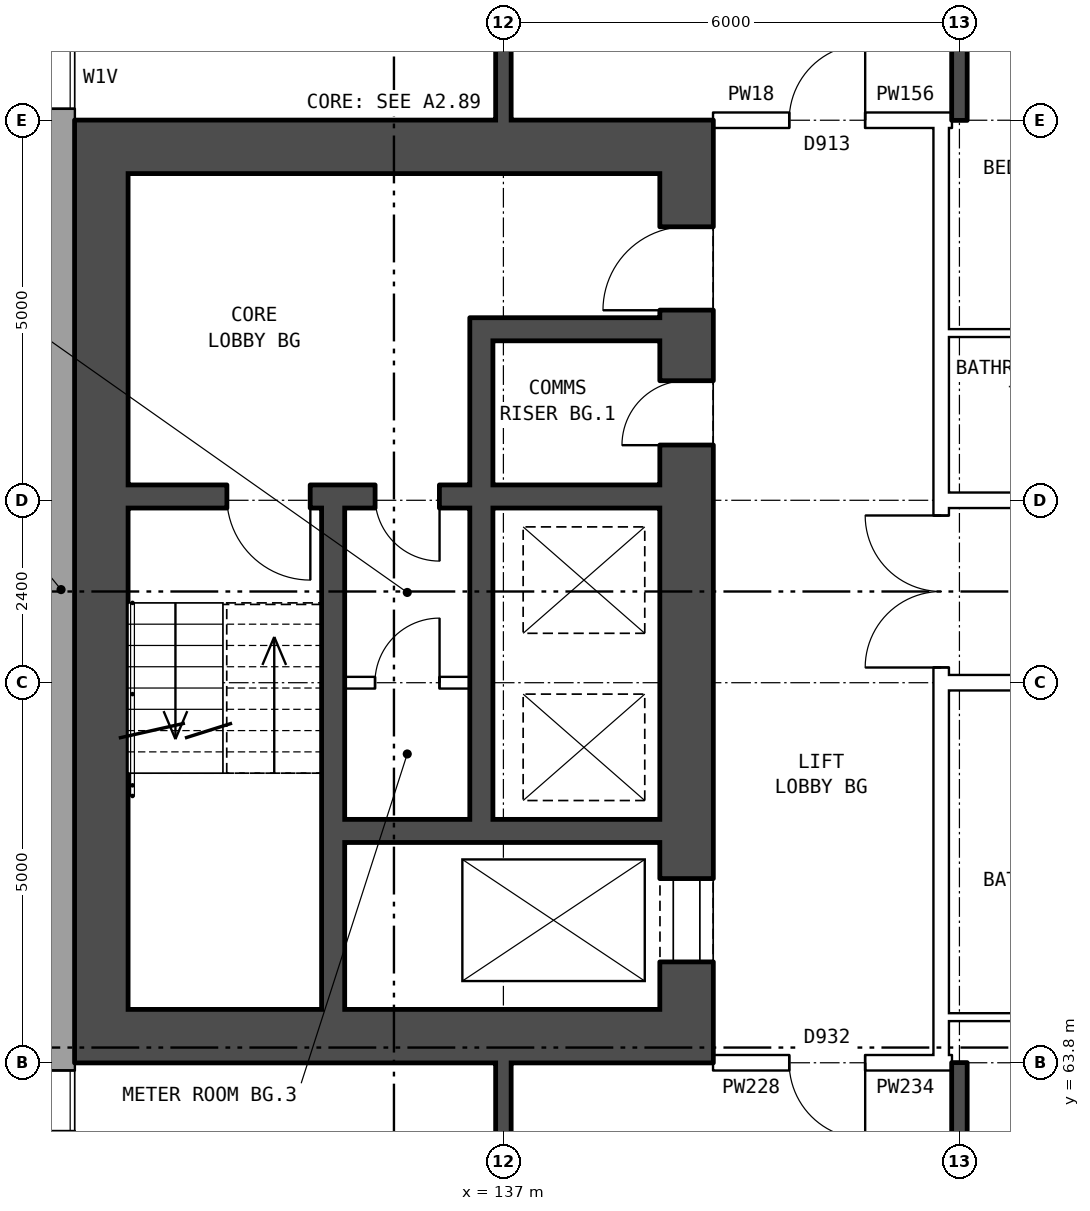
"""IFC4 building model, lengths in metres.
Left out: names, types, materials, properties, quantities, classifications, styles, units other than length and angle.
Written with IfcOpenShell. Run it as: python <this file> out.ifc"""

import sys

from ifc_helpers import new_model, si_unit, direction, frame, frame_2d, origin, place, context, subcontext, project, spatial, rectangle, extrude, element, fill, save


model = new_model("IFC4")
c1 = context("Model", 3, precision=1e-05, world=origin(), true_north=direction((0.0, 1.0)))
c2 = subcontext(c1, "Body", "Model", "MODEL_VIEW")
j1 = project(units=[si_unit("LENGTHUNIT", "METRE"), si_unit("PLANEANGLEUNIT", "RADIAN")], contexts=[c1])
p1 = place(None, origin())
s1 = spatial("IfcSite", under=j1, at=p1, CompositionType="ELEMENT")
p2 = place(p1, origin())
s2 = spatial("IfcBuilding", under=s1, at=p2, CompositionType="ELEMENT")
p3 = place(p2, frame((0.0, 0.0, 71.6)))
s3 = spatial("IfcBuildingStorey", under=s2, at=p3, CompositionType="ELEMENT", Elevation=71.6)
p4 = place(p3, frame((131.18, 82.925, 0.0), z_axis=(0.0, 0.0, 1.0), x_axis=(0.0, -1.0, 0.0)))
e1 = element("IfcWall", 1, at=p4, inside=s3, PredefinedType="STANDARD", context=c2, shape_type="SweptSolid", body=[
    extrude(rectangle(XDim=25.851, YDim=0.36, at=frame_2d((12.925, 0.0))), origin(), (0.0, 0.0, 1.0), 2.85),
])
p5 = place(p4, frame((1.625, 0.0, 0.8)))
e2 = element("IfcOpeningElement", 2, at=p5, cuts=e1, PredefinedType="OPENING", context=c2, shape_type="SweptSolid", body=[
    extrude(rectangle(XDim=1.6, YDim=1.8, at=frame_2d((0.8, 0.9))), frame((0.0, 0.19, 0.0), z_axis=(0.0, -1.0, 0.0), x_axis=(1.0, 0.0, 0.0)), (0.0, 0.0, 1.0), 0.38),
])
p6 = place(p4, frame((3.525, 0.0, 1.7)))
e3 = element("IfcOpeningElement", 3, at=p6, cuts=e1, PredefinedType="OPENING", context=c2, shape_type="SweptSolid", body=[
    extrude(rectangle(XDim=1.2, YDim=0.9, at=frame_2d((0.6, 0.45))), frame((0.0, 0.19, 0.0), z_axis=(0.0, -1.0, 0.0), x_axis=(1.0, 0.0, 0.0)), (0.0, 0.0, 1.0), 0.38),
])
p7 = place(p4, frame((19.225, 0.0, 0.8)))
e4 = element("IfcOpeningElement", 4, at=p7, cuts=e1, PredefinedType="OPENING", context=c2, shape_type="SweptSolid", body=[
    extrude(rectangle(XDim=0.8, YDim=0.9, at=frame_2d((0.4, 0.45))), frame((0.0, 0.19, 0.0), z_axis=(0.0, -1.0, 0.0), x_axis=(1.0, 0.0, 0.0)), (0.0, 0.0, 1.0), 0.38),
])
p8 = place(p4, frame((22.625, 0.0, 0.8)))
e5 = element("IfcOpeningElement", 5, at=p8, cuts=e1, PredefinedType="OPENING", context=c2, shape_type="SweptSolid", body=[
    extrude(rectangle(XDim=1.6, YDim=1.8, at=frame_2d((0.8, 0.9))), frame((0.0, 0.19, 0.0), z_axis=(0.0, -1.0, 0.0), x_axis=(1.0, 0.0, 0.0)), (0.0, 0.0, 1.0), 0.38),
])
p9 = place(p4, frame((5.775, 0.0, 0.8)))
e6 = element("IfcOpeningElement", 6, at=p9, cuts=e1, PredefinedType="OPENING", context=c2, shape_type="SweptSolid", body=[
    extrude(rectangle(XDim=0.8, YDim=0.9, at=frame_2d((0.4, 0.45))), frame((0.0, 0.19, 0.0), z_axis=(0.0, -1.0, 0.0), x_axis=(1.0, 0.0, 0.0)), (0.0, 0.0, 1.0), 0.38),
])
p10 = place(p4, frame((21.075, 0.0, 1.7)))
e7 = element("IfcOpeningElement", 7, at=p10, cuts=e1, PredefinedType="OPENING", context=c2, shape_type="SweptSolid", body=[
    extrude(rectangle(XDim=1.2, YDim=0.9, at=frame_2d((0.6, 0.45))), frame((0.0, 0.19, 0.0), z_axis=(0.0, -1.0, 0.0), x_axis=(1.0, 0.0, 0.0)), (0.0, 0.0, 1.0), 0.38),
])
p11 = place(p3, frame((139.41, 64.5, 0.0), z_axis=(0.0, 0.0, 1.0), x_axis=(0.0, 1.0, 0.0)))
e8 = element("IfcWall", 8, at=p11, inside=s3, PredefinedType="SHEAR", context=c2, shape_type="SweptSolid", body=[
    extrude(rectangle(XDim=11.0, YDim=0.7, at=frame_2d((5.5, 0.0))), origin(), (0.0, 0.0, 1.0), 2.85),
])
p12 = place(p11, frame((0.625, 0.0, 0.0)))
e9 = element("IfcOpeningElement", 9, at=p12, cuts=e8, PredefinedType="OPENING", context=c2, shape_type="SweptSolid", body=[
    extrude(rectangle(XDim=1.1, YDim=2.1, at=frame_2d((0.55, 1.05))), frame((0.0, 0.36, 0.0), z_axis=(0.0, -1.0, 0.0), x_axis=(1.0, 0.0, 0.0)), (0.0, 0.0, 1.0), 0.72),
])
p13 = place(p11, frame((9.2, 0.0, 0.0)))
e10 = element("IfcOpeningElement", 10, at=p13, cuts=e8, PredefinedType="OPENING", context=c2, shape_type="SweptSolid", body=[
    extrude(rectangle(XDim=1.1, YDim=2.1, at=frame_2d((0.55, 1.05))), frame((0.0, 0.36, 0.0), z_axis=(0.0, -1.0, 0.0), x_axis=(1.0, 0.0, 0.0)), (0.0, 0.0, 1.0), 0.72),
])
p14 = place(p11, frame((7.425, 0.0, 0.0)))
e11 = element("IfcOpeningElement", 11, at=p14, cuts=e8, PredefinedType="OPENING", context=c2, shape_type="SweptSolid", body=[
    extrude(rectangle(XDim=0.85, YDim=2.1, at=frame_2d((0.425, 1.05))), frame((0.0, 0.36, 0.0), z_axis=(0.0, -1.0, 0.0), x_axis=(1.0, 0.0, 0.0)), (0.0, 0.0, 1.0), 0.72),
])
p15 = place(p3, frame((131.71, 64.5, 0.0), z_axis=(0.0, 0.0, 1.0), x_axis=(0.0, 1.0, 0.0)))
e12 = element("IfcWall", 12, at=p15, inside=s3, PredefinedType="SHEAR", context=c2, shape_type="SweptSolid", body=[
    extrude(rectangle(XDim=11.0, YDim=0.7, at=frame_2d((5.5, 0.0))), origin(), (0.0, 0.0, 1.0), 2.85),
])
for number, where, z_axis, x_axis in (
    (13, (139.76, 64.15, 0.0), (0.0, 0.0, 1.0), (-1.0, 0.0, 0.0)),
    (14, (139.76, 75.85, 0.0), (0.0, 0.0, 1.0), (-1.0, 0.0, 0.0)),
):
    element("IfcWall", number, at=place(p3, frame(where, z_axis=z_axis, x_axis=x_axis)), inside=s3, PredefinedType="SHEAR", context=c2, shape_type="SweptSolid", body=[
        extrude(rectangle(XDim=8.4, YDim=0.7, at=frame_2d((4.2, 0.0))), origin(), (0.0, 0.0, 1.0), 2.85),
    ])
p16 = place(p3, frame((139.06, 66.85, 0.0), z_axis=(0.0, 0.0, 1.0), x_axis=(-1.0, 0.0, 0.0)))
e15 = element("IfcWall", 15, at=p16, inside=s3, PredefinedType="SHEAR", context=c2, shape_type="SweptSolid", body=[
    extrude(rectangle(XDim=4.15, YDim=0.3, at=frame_2d((2.075, 0.0))), origin(), (0.0, 0.0, 1.0), 2.85),
])
p17 = place(p3, frame((136.56, 68.8, 0.0), z_axis=(0.0, 0.0, 1.0), x_axis=(-1.0, 0.0, 0.0)))
e16 = element("IfcWall", 16, at=p17, inside=s3, PredefinedType="PARTITIONING", context=c2, shape_type="SweptSolid", body=[
    extrude(rectangle(XDim=1.65, YDim=0.15, at=frame_2d((0.825, 0.0))), origin(), (0.0, 0.0, 1.0), 2.85),
])
p18 = place(p17, frame((0.4, 0.0, 0.0)))
e17 = element("IfcOpeningElement", 17, at=p18, cuts=e16, PredefinedType="OPENING", context=c2, shape_type="SweptSolid", body=[
    extrude(rectangle(XDim=0.85, YDim=2.1, at=frame_2d((0.425, 1.05))), frame((0.0, 0.085, 0.0), z_axis=(0.0, -1.0, 0.0), x_axis=(1.0, 0.0, 0.0)), (0.0, 0.0, 1.0), 0.17),
])
p19 = place(p3, frame((139.06, 71.25, 0.0), z_axis=(0.0, 0.0, 1.0), x_axis=(-1.0, 0.0, 0.0)))
e18 = element("IfcWall", 18, at=p19, inside=s3, PredefinedType="SHEAR", context=c2, shape_type="SweptSolid", body=[
    extrude(rectangle(XDim=7.0, YDim=0.3, at=frame_2d((3.5, 0.0))), origin(), (0.0, 0.0, 1.0), 2.85),
])
p20 = place(p19, frame((4.6, 0.0, 0.0)))
e19 = element("IfcOpeningElement", 19, at=p20, cuts=e18, PredefinedType="OPENING", context=c2, shape_type="SweptSolid", body=[
    extrude(rectangle(XDim=1.1, YDim=2.1, at=frame_2d((0.55, 1.05))), frame((0.0, 0.16, 0.0), z_axis=(0.0, -1.0, 0.0), x_axis=(1.0, 0.0, 0.0)), (0.0, 0.0, 1.0), 0.32),
])
p21 = place(p19, frame((2.9, 0.0, 0.0)))
e20 = element("IfcOpeningElement", 20, at=p21, cuts=e18, PredefinedType="OPENING", context=c2, shape_type="SweptSolid", body=[
    extrude(rectangle(XDim=0.85, YDim=2.1, at=frame_2d((0.425, 1.05))), frame((0.0, 0.16, 0.0), z_axis=(0.0, -1.0, 0.0), x_axis=(1.0, 0.0, 0.0)), (0.0, 0.0, 1.0), 0.32),
])
p22 = place(p3, frame((139.06, 73.45, 0.0), z_axis=(0.0, 0.0, 1.0), x_axis=(-1.0, 0.0, 0.0)))
e21 = element("IfcWall", 21, at=p22, inside=s3, PredefinedType="SHEAR", context=c2, shape_type="SweptSolid", body=[
    extrude(rectangle(XDim=2.2, YDim=0.3, at=frame_2d((1.1, 0.0))), origin(), (0.0, 0.0, 1.0), 2.85),
])
p23 = place(p3, frame((136.71, 67.0, 0.0), z_axis=(0.0, 0.0, 1.0), x_axis=(0.0, 1.0, 0.0)))
e22 = element("IfcWall", 22, at=p23, inside=s3, PredefinedType="SHEAR", context=c2, shape_type="SweptSolid", body=[
    extrude(rectangle(XDim=4.1, YDim=0.3, at=frame_2d((2.05, 0.0))), origin(), (0.0, 0.0, 1.0), 2.85),
])
p24 = place(p3, frame((136.71, 71.4, 0.0), z_axis=(0.0, 0.0, 1.0), x_axis=(0.0, 1.0, 0.0)))
e23 = element("IfcWall", 23, at=p24, inside=s3, PredefinedType="SHEAR", context=c2, shape_type="SweptSolid", body=[
    extrude(rectangle(XDim=2.2, YDim=0.3, at=frame_2d((1.1, 0.0))), origin(), (0.0, 0.0, 1.0), 2.85),
])
p25 = place(p3, frame((134.76, 64.5, 0.0), z_axis=(0.0, 0.0, 1.0), x_axis=(0.0, 1.0, 0.0)))
e24 = element("IfcWall", 24, at=p25, inside=s3, PredefinedType="SHEAR", context=c2, shape_type="SweptSolid", body=[
    extrude(rectangle(XDim=6.6, YDim=0.3, at=frame_2d((3.3, 0.0))), origin(), (0.0, 0.0, 1.0), 2.85),
])
p26 = place(p3, frame((142.76, 63.9, 0.0), z_axis=(0.0, 0.0, 1.0), x_axis=(0.0, 1.0, 0.0)))
e25 = element("IfcWall", 25, at=p26, inside=s3, PredefinedType="PARTITIONING", context=c2, shape_type="SweptSolid", body=[
    extrude(rectangle(XDim=12.2, YDim=0.2, at=frame_2d((6.1, 0.0))), origin(), (0.0, 0.0, 1.0), 2.85),
])
p27 = place(p26, frame((5.1, 0.0, 0.0)))
e26 = element("IfcOpeningElement", 26, at=p27, cuts=e25, PredefinedType="OPENING", context=c2, shape_type="SweptSolid", body=[
    extrude(rectangle(XDim=2.0, YDim=2.1, at=frame_2d((1.0, 1.05))), frame((0.0, 0.11, 0.0), z_axis=(0.0, -1.0, 0.0), x_axis=(1.0, 0.0, 0.0)), (0.0, 0.0, 1.0), 0.22),
])
p28 = place(p3, frame((139.76, 63.8, 0.0), z_axis=(0.0, 0.0, 1.0), x_axis=(1.0, 0.0, 0.0)))
e27 = element("IfcWall", 27, at=p28, inside=s3, PredefinedType="PARTITIONING", context=c2, shape_type="SweptSolid", body=[
    extrude(rectangle(XDim=3.0, YDim=0.2, at=frame_2d((1.5, 0.0))), origin(), (0.0, 0.0, 1.0), 2.85),
])
p29 = place(p28, frame((1.0, 0.0, 0.0)))
e28 = element("IfcOpeningElement", 28, at=p29, cuts=e27, PredefinedType="OPENING", context=c2, shape_type="SweptSolid", body=[
    extrude(rectangle(XDim=1.0, YDim=2.1, at=frame_2d((0.5, 1.05))), frame((0.0, 0.11, 0.0), z_axis=(0.0, -1.0, 0.0), x_axis=(1.0, 0.0, 0.0)), (0.0, 0.0, 1.0), 0.22),
])
p30 = place(p3, frame((142.76, 63.8, 0.0), z_axis=(0.0, 0.0, 1.0), x_axis=(1.0, 0.0, 0.0)))
e29 = element("IfcWall", 29, at=p30, inside=s3, PredefinedType="PARTITIONING", context=c2, shape_type="SweptSolid", body=[
    extrude(rectangle(XDim=0.14, YDim=0.2, at=frame_2d((0.07, 0.0))), origin(), (0.0, 0.0, 1.0), 2.85),
])
p31 = place(p3, frame((142.76, 64.4, 0.0), z_axis=(0.0, 0.0, 1.0), x_axis=(1.0, 0.0, 0.0)))
e30 = element("IfcWall", 30, at=p31, inside=s3, PredefinedType="PARTITIONING", context=c2, shape_type="SweptSolid", body=[
    extrude(rectangle(XDim=3.24, YDim=0.1, at=frame_2d((1.62, 0.0))), origin(), (0.0, 0.0, 1.0), 2.85),
])
p32 = place(p3, frame((142.76, 68.8, 0.0), z_axis=(0.0, 0.0, 1.0), x_axis=(1.0, 0.0, 0.0)))
e31 = element("IfcWall", 31, at=p32, inside=s3, PredefinedType="PARTITIONING", context=c2, shape_type="SweptSolid", body=[
    extrude(rectangle(XDim=14.48, YDim=0.2, at=frame_2d((7.24, 0.0))), origin(), (0.0, 0.0, 1.0), 2.85),
])
p33 = place(p32, frame((4.24, 0.0, 0.0)))
e32 = element("IfcOpeningElement", 32, at=p33, cuts=e31, PredefinedType="OPENING", context=c2, shape_type="SweptSolid", body=[
    extrude(rectangle(XDim=1.0, YDim=2.1, at=frame_2d((0.5, 1.05))), frame((0.0, 0.11, 0.0), z_axis=(0.0, -1.0, 0.0), x_axis=(1.0, 0.0, 0.0)), (0.0, 0.0, 1.0), 0.22),
])
p34 = place(p32, frame((10.24, 0.0, 0.0)))
e33 = element("IfcOpeningElement", 33, at=p34, cuts=e31, PredefinedType="OPENING", context=c2, shape_type="SweptSolid", body=[
    extrude(rectangle(XDim=1.0, YDim=2.1, at=frame_2d((0.5, 1.05))), frame((0.0, 0.11, 0.0), z_axis=(0.0, -1.0, 0.0), x_axis=(1.0, 0.0, 0.0)), (0.0, 0.0, 1.0), 0.22),
])
p35 = place(p3, frame((142.76, 71.2, 0.0), z_axis=(0.0, 0.0, 1.0), x_axis=(1.0, 0.0, 0.0)))
e34 = element("IfcWall", 34, at=p35, inside=s3, PredefinedType="PARTITIONING", context=c2, shape_type="SweptSolid", body=[
    extrude(rectangle(XDim=14.48, YDim=0.2, at=frame_2d((7.24, 0.0))), origin(), (0.0, 0.0, 1.0), 2.85),
])
p36 = place(p35, frame((4.24, 0.0, 0.0)))
e35 = element("IfcOpeningElement", 35, at=p36, cuts=e34, PredefinedType="OPENING", context=c2, shape_type="SweptSolid", body=[
    extrude(rectangle(XDim=1.0, YDim=2.1, at=frame_2d((0.5, 1.05))), frame((0.0, 0.11, 0.0), z_axis=(0.0, -1.0, 0.0), x_axis=(1.0, 0.0, 0.0)), (0.0, 0.0, 1.0), 0.22),
])
p37 = place(p35, frame((7.24, 0.0, 0.0)))
e36 = element("IfcOpeningElement", 36, at=p37, cuts=e34, PredefinedType="OPENING", context=c2, shape_type="SweptSolid", body=[
    extrude(rectangle(XDim=1.0, YDim=2.1, at=frame_2d((0.5, 1.05))), frame((0.0, 0.11, 0.0), z_axis=(0.0, -1.0, 0.0), x_axis=(1.0, 0.0, 0.0)), (0.0, 0.0, 1.0), 0.22),
])
p38 = place(p3, frame((142.76, 73.4, 0.0), z_axis=(0.0, 0.0, 1.0), x_axis=(1.0, 0.0, 0.0)))
e37 = element("IfcWall", 37, at=p38, inside=s3, PredefinedType="PARTITIONING", context=c2, shape_type="SweptSolid", body=[
    extrude(rectangle(XDim=3.24, YDim=0.1, at=frame_2d((1.62, 0.0))), origin(), (0.0, 0.0, 1.0), 2.85),
])
p39 = place(p3, frame((139.76, 76.2, 0.0), z_axis=(0.0, 0.0, 1.0), x_axis=(1.0, 0.0, 0.0)))
e38 = element("IfcWall", 38, at=p39, inside=s3, PredefinedType="PARTITIONING", context=c2, shape_type="SweptSolid", body=[
    extrude(rectangle(XDim=3.0, YDim=0.2, at=frame_2d((1.5, 0.0))), origin(), (0.0, 0.0, 1.0), 2.85),
])
p40 = place(p39, frame((1.0, 0.0, 0.0)))
e39 = element("IfcOpeningElement", 39, at=p40, cuts=e38, PredefinedType="OPENING", context=c2, shape_type="SweptSolid", body=[
    extrude(rectangle(XDim=1.0, YDim=2.1, at=frame_2d((0.5, 1.05))), frame((0.0, 0.11, 0.0), z_axis=(0.0, -1.0, 0.0), x_axis=(1.0, 0.0, 0.0)), (0.0, 0.0, 1.0), 0.22),
])
p41 = place(p3, frame((142.76, 76.2, 0.0), z_axis=(0.0, 0.0, 1.0), x_axis=(1.0, 0.0, 0.0)))
e40 = element("IfcWall", 40, at=p41, inside=s3, PredefinedType="PARTITIONING", context=c2, shape_type="SweptSolid", body=[
    extrude(rectangle(XDim=0.14, YDim=0.2, at=frame_2d((0.07, 0.0))), origin(), (0.0, 0.0, 1.0), 2.85),
])
p42 = place(p3, frame((137.0, 54.36, 0.0), z_axis=(0.0, 0.0, 1.0), x_axis=(0.0, 1.0, 0.0)))
e41 = element("IfcWall", 41, at=p42, inside=s3, PredefinedType="SOLIDWALL", context=c2, shape_type="SweptSolid", body=[
    extrude(rectangle(XDim=9.44, YDim=0.2, at=frame_2d((4.72, 0.0))), origin(), (0.0, 0.0, 1.0), 2.85),
])
p43 = place(p42, frame((1.37, 0.0, 0.0)))
e42 = element("IfcOpeningElement", 42, at=p43, cuts=e41, PredefinedType="OPENING", context=c2, shape_type="SweptSolid", body=[
    extrude(rectangle(XDim=0.9, YDim=2.1, at=frame_2d((0.45, 1.05))), frame((0.0, 0.11, 0.0), z_axis=(0.0, -1.0, 0.0), x_axis=(1.0, 0.0, 0.0)), (0.0, 0.0, 1.0), 0.22),
])
p44 = place(p42, frame((7.04, 0.0, 0.0)))
e43 = element("IfcOpeningElement", 43, at=p44, cuts=e41, PredefinedType="OPENING", context=c2, shape_type="SweptSolid", body=[
    extrude(rectangle(XDim=0.9, YDim=2.1, at=frame_2d((0.45, 1.05))), frame((0.0, 0.11, 0.0), z_axis=(0.0, -1.0, 0.0), x_axis=(1.0, 0.0, 0.0)), (0.0, 0.0, 1.0), 0.22),
])
p45 = place(p3, frame((137.0, 76.2, 0.0), z_axis=(0.0, 0.0, 1.0), x_axis=(0.0, 1.0, 0.0)))
e44 = element("IfcWall", 44, at=p45, inside=s3, PredefinedType="SOLIDWALL", context=c2, shape_type="SweptSolid", body=[
    extrude(rectangle(XDim=9.44, YDim=0.2, at=frame_2d((4.72, 0.0))), origin(), (0.0, 0.0, 1.0), 2.85),
])
p46 = place(p45, frame((1.5, 0.0, 0.0)))
e45 = element("IfcOpeningElement", 45, at=p46, cuts=e44, PredefinedType="OPENING", context=c2, shape_type="SweptSolid", body=[
    extrude(rectangle(XDim=0.9, YDim=2.1, at=frame_2d((0.45, 1.05))), frame((0.0, 0.11, 0.0), z_axis=(0.0, -1.0, 0.0), x_axis=(1.0, 0.0, 0.0)), (0.0, 0.0, 1.0), 0.22),
])
for number, where, z_axis, x_axis in (
    (46, (143.0, 54.36, 0.0), (0.0, 0.0, 1.0), (0.0, 1.0, 0.0)),
    (47, (143.0, 76.2, 0.0), (0.0, 0.0, 1.0), (0.0, 1.0, 0.0)),
):
    element("IfcWall", number, at=place(p3, frame(where, z_axis=z_axis, x_axis=x_axis)), inside=s3, PredefinedType="SOLIDWALL", context=c2, shape_type="SweptSolid", body=[
        extrude(rectangle(XDim=9.44, YDim=0.2, at=frame_2d((4.72, 0.0))), origin(), (0.0, 0.0, 1.0), 2.85),
    ])
p47 = place(p7, origin())
e48 = element("IfcWindow", 48, at=p47, inside=s3, PartitioningType="SINGLE_PANEL", PredefinedType="WINDOW", context=c2, shape_type="SweptSolid", body=[
    extrude(rectangle(XDim=0.8, YDim=0.9, at=frame_2d((0.4, 0.45))), frame((0.0, 0.15, 0.0), z_axis=(0.0, -1.0, 0.0), x_axis=(1.0, 0.0, 0.0)), (0.0, 0.0, 1.0), 0.06),
])
fill(e4, e48)
p48 = place(p12, origin())
e49 = element("IfcDoor", 49, at=p48, inside=s3, OperationType="DOUBLE_DOOR_SLIDING", PredefinedType="DOOR", context=c2, shape_type="SweptSolid", body=[
    extrude(rectangle(XDim=1.1, YDim=2.1, at=frame_2d((0.55, 1.05))), frame((0.0, 0.335, 0.0), z_axis=(0.0, -1.0, 0.0), x_axis=(1.0, 0.0, 0.0)), (0.0, 0.0, 1.0), 0.05),
])
fill(e9, e49)
p49 = place(p13, origin())
e50 = element("IfcDoor", 50, at=p49, inside=s3, OperationType="SINGLE_SWING_LEFT", PredefinedType="DOOR", context=c2, shape_type="SweptSolid", body=[
    extrude(rectangle(XDim=1.1, YDim=2.1, at=frame_2d((0.55, 1.05))), frame((0.0, 0.335, 0.0), z_axis=(0.0, -1.0, 0.0), x_axis=(1.0, 0.0, 0.0)), (0.0, 0.0, 1.0), 0.05),
])
fill(e10, e50)
p50 = place(p20, origin())
e51 = element("IfcDoor", 51, at=p50, inside=s3, OperationType="SINGLE_SWING_LEFT", PredefinedType="DOOR", context=c2, shape_type="SweptSolid", body=[
    extrude(rectangle(XDim=1.1, YDim=2.1, at=frame_2d((0.55, 1.05))), frame((0.0, 0.025, 0.0), z_axis=(0.0, -1.0, 0.0), x_axis=(1.0, 0.0, 0.0)), (0.0, 0.0, 1.0), 0.05),
])
fill(e19, e51)
p51 = place(p14, origin())
e52 = element("IfcDoor", 52, at=p51, inside=s3, OperationType="SINGLE_SWING_LEFT", PredefinedType="DOOR", context=c2, shape_type="SweptSolid", body=[
    extrude(rectangle(XDim=0.85, YDim=2.1, at=frame_2d((0.425, 1.05))), frame((0.0, 0.335, 0.0), z_axis=(0.0, -1.0, 0.0), x_axis=(1.0, 0.0, 0.0)), (0.0, 0.0, 1.0), 0.05),
])
fill(e11, e52)
p52 = place(p21, origin())
e53 = element("IfcDoor", 53, at=p52, inside=s3, OperationType="SINGLE_SWING_LEFT", PredefinedType="DOOR", context=c2, shape_type="SweptSolid", body=[
    extrude(rectangle(XDim=0.85, YDim=2.1, at=frame_2d((0.425, 1.05))), frame((0.0, 0.025, 0.0), z_axis=(0.0, -1.0, 0.0), x_axis=(1.0, 0.0, 0.0)), (0.0, 0.0, 1.0), 0.05),
])
fill(e20, e53)
p53 = place(p18, frame((0.85, 0.0, 0.0), z_axis=(0.0, 0.0, 1.0), x_axis=(-1.0, 0.0, 0.0)))
e54 = element("IfcDoor", 54, at=p53, inside=s3, OperationType="SINGLE_SWING_RIGHT", PredefinedType="DOOR", context=c2, shape_type="SweptSolid", body=[
    extrude(rectangle(XDim=0.85, YDim=2.1, at=frame_2d((0.425, 1.05))), frame((0.0, 0.025, 0.0), z_axis=(0.0, -1.0, 0.0), x_axis=(1.0, 0.0, 0.0)), (0.0, 0.0, 1.0), 0.05),
])
fill(e17, e54)
p54 = place(p27, origin())
e55 = element("IfcDoor", 55, at=p54, inside=s3, OperationType="DOUBLE_DOOR_SINGLE_SWING", PredefinedType="DOOR", context=c2, shape_type="SweptSolid", body=[
    extrude(rectangle(XDim=2.0, YDim=2.1, at=frame_2d((1.0, 1.05))), frame((0.0, 0.025, 0.0), z_axis=(0.0, -1.0, 0.0), x_axis=(1.0, 0.0, 0.0)), (0.0, 0.0, 1.0), 0.05),
])
fill(e26, e55)
p55 = place(p29, frame((1.0, 0.0, 0.0), z_axis=(0.0, 0.0, 1.0), x_axis=(-1.0, 0.0, 0.0)))
e56 = element("IfcDoor", 56, at=p55, inside=s3, OperationType="SINGLE_SWING_LEFT", PredefinedType="DOOR", context=c2, shape_type="SweptSolid", body=[
    extrude(rectangle(XDim=1.0, YDim=2.1, at=frame_2d((0.5, 1.05))), frame((0.0, 0.025, 0.0), z_axis=(0.0, -1.0, 0.0), x_axis=(1.0, 0.0, 0.0)), (0.0, 0.0, 1.0), 0.05),
])
fill(e28, e56)
p56 = place(p40, origin())
e57 = element("IfcDoor", 57, at=p56, inside=s3, OperationType="SINGLE_SWING_RIGHT", PredefinedType="DOOR", context=c2, shape_type="SweptSolid", body=[
    extrude(rectangle(XDim=1.0, YDim=2.1, at=frame_2d((0.5, 1.05))), frame((0.0, 0.025, 0.0), z_axis=(0.0, -1.0, 0.0), x_axis=(1.0, 0.0, 0.0)), (0.0, 0.0, 1.0), 0.05),
])
fill(e39, e57)
p57 = place(p9, origin())
e58 = element("IfcWindow", 58, at=p57, inside=s3, PartitioningType="SINGLE_PANEL", PredefinedType="WINDOW", context=c2, shape_type="SweptSolid", body=[
    extrude(rectangle(XDim=0.8, YDim=0.9, at=frame_2d((0.4, 0.45))), frame((0.0, 0.15, 0.0), z_axis=(0.0, -1.0, 0.0), x_axis=(1.0, 0.0, 0.0)), (0.0, 0.0, 1.0), 0.06),
])
fill(e6, e58)
save(model, sys.argv[1])
